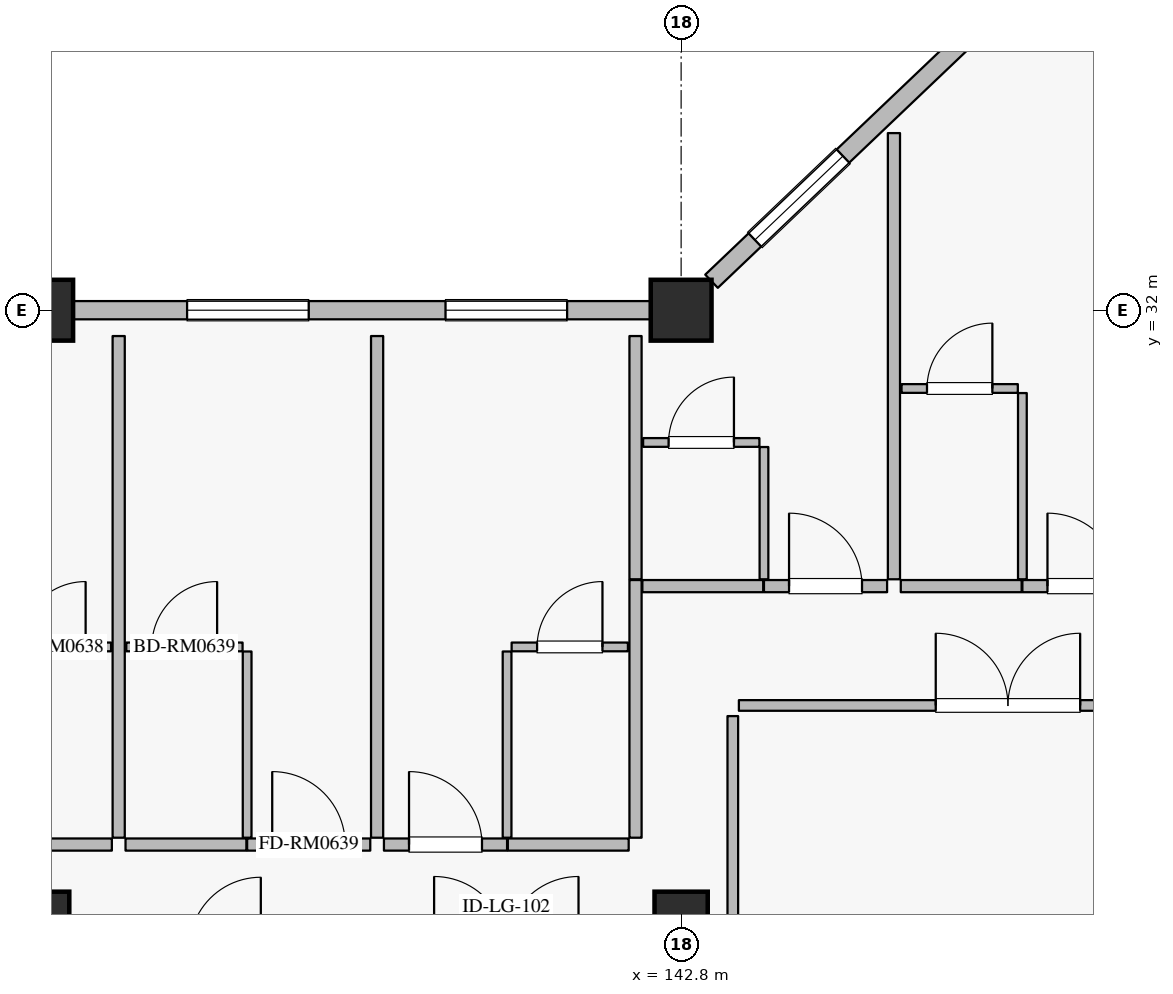
"""IFC4 building model, lengths in metres.
Left out: names, types, materials, properties, quantities, classifications, styles, units other than length and angle.
Written with IfcOpenShell. Run it as: python <this file> out.ifc"""

import sys

from ifc_helpers import new_model, si_unit, direction, frame, frame_2d, origin, origin_2d, place, context, subcontext, project, spatial, rectangle, extrude, element, fill, save


model = new_model("IFC4")
c1 = context("Model", 3, precision=1e-05, world=origin(), true_north=direction((0.0, 1.0)))
c2 = subcontext(c1, "Body", "Model", "MODEL_VIEW")
j1 = project(units=[si_unit("LENGTHUNIT", "METRE"), si_unit("PLANEANGLEUNIT", "RADIAN")], contexts=[c1])
p1 = place(None, origin())
s1 = spatial("IfcSite", under=j1, at=p1, CompositionType="ELEMENT")
p2 = place(p1, origin())
s2 = spatial("IfcBuilding", under=s1, at=p2, CompositionType="ELEMENT")
p3 = place(p2, frame((0.0, 0.0, 25.2)))
s3 = spatial("IfcBuildingStorey", under=s2, at=p3, CompositionType="ELEMENT", Elevation=25.2)
for number, where, z_axis, x_axis in (
    (1, (134.4, 32.0, 0.0), (0.0, 0.0, 1.0), (1.0, 0.0, 0.0)),
    (2, (142.8, 32.0, 0.0), (0.0, 0.0, 1.0), (1.0, 0.0, 0.0)),
):
    element("IfcColumn", number, at=place(p3, frame(where, z_axis=z_axis, x_axis=x_axis)), inside=s3, PredefinedType="COLUMN", context=c2, shape_type="SweptSolid", body=[
        extrude(rectangle(XDim=0.8, YDim=0.8, at=origin_2d()), origin(), (0.0, 0.0, 1.0), 3.6),
    ])
for number, where, z_axis, x_axis in (
    (3, (134.4, 24.0, 0.0), (0.0, 0.0, 1.0), (1.0, 0.0, 0.0)),
    (4, (142.8, 24.0, 0.0), (0.0, 0.0, 1.0), (1.0, 0.0, 0.0)),
):
    element("IfcColumn", number, at=place(p3, frame(where, z_axis=z_axis, x_axis=x_axis)), inside=s3, PredefinedType="COLUMN", context=c2, shape_type="SweptSolid", body=[
        extrude(rectangle(XDim=0.7, YDim=0.7, at=origin_2d()), origin(), (0.0, 0.0, 1.0), 3.6),
    ])
p4 = place(p3, frame((134.8, 32.0, 0.0), z_axis=(0.0, 0.0, 1.0), x_axis=(1.0, 0.0, 0.0)))
e5 = element("IfcWall", 5, at=p4, inside=s3, PredefinedType="SOLIDWALL", context=c2, shape_type="SweptSolid", body=[
    extrude(rectangle(XDim=7.6, YDim=0.24, at=frame_2d((3.8, 0.0))), origin(), (0.0, 0.0, 1.0), 2.93),
])
p5 = place(p4, frame((1.5, 0.0, 0.8)))
e6 = element("IfcOpeningElement", 6, at=p5, cuts=e5, PredefinedType="OPENING", context=c2, shape_type="SweptSolid", body=[
    extrude(rectangle(XDim=1.6, YDim=1.6, at=frame_2d((0.8, 0.8))), frame((0.0, 0.13, 0.0), z_axis=(0.0, -1.0, 0.0), x_axis=(1.0, 0.0, 0.0)), (0.0, 0.0, 1.0), 0.26),
])
p6 = place(p4, frame((4.9, 0.0, 0.8)))
e7 = element("IfcOpeningElement", 7, at=p6, cuts=e5, PredefinedType="OPENING", context=c2, shape_type="SweptSolid", body=[
    extrude(rectangle(XDim=1.6, YDim=1.6, at=frame_2d((0.8, 0.8))), frame((0.0, 0.13, 0.0), z_axis=(0.0, -1.0, 0.0), x_axis=(1.0, 0.0, 0.0)), (0.0, 0.0, 1.0), 0.26),
])
p7 = place(p3, frame((143.2, 32.381, 0.0), z_axis=(0.0, 0.0, 1.0), x_axis=(0.724156739794, 0.689635422677, 0.0)))
e8 = element("IfcWall", 8, at=p7, inside=s3, PredefinedType="SOLIDWALL", context=c2, shape_type="SweptSolid", body=[
    extrude(rectangle(XDim=10.495, YDim=0.24, at=frame_2d((5.248, 0.0))), origin(), (0.0, 0.0, 1.0), 2.93),
])
p8 = place(p7, frame((0.788, 0.0, 0.8)))
e9 = element("IfcOpeningElement", 9, at=p8, cuts=e8, PredefinedType="OPENING", context=c2, shape_type="SweptSolid", body=[
    extrude(rectangle(XDim=1.6, YDim=1.6, at=frame_2d((0.8, 0.8))), frame((0.0, 0.13, 0.0), z_axis=(0.0, -1.0, 0.0), x_axis=(1.0, 0.0, 0.0)), (0.0, 0.0, 1.0), 0.26),
])
p9 = place(p7, frame((4.862, 0.0, 0.8)))
e10 = element("IfcOpeningElement", 10, at=p9, cuts=e8, PredefinedType="OPENING", context=c2, shape_type="SweptSolid", body=[
    extrude(rectangle(XDim=1.6, YDim=1.6, at=frame_2d((0.8, 0.8))), frame((0.0, 0.13, 0.0), z_axis=(0.0, -1.0, 0.0), x_axis=(1.0, 0.0, 0.0)), (0.0, 0.0, 1.0), 0.26),
])
p10 = place(p7, frame((8.521, 0.0, 0.8)))
e11 = element("IfcOpeningElement", 11, at=p10, cuts=e8, PredefinedType="OPENING", context=c2, shape_type="SweptSolid", body=[
    extrude(rectangle(XDim=1.6, YDim=1.6, at=frame_2d((0.8, 0.8))), frame((0.0, 0.13, 0.0), z_axis=(0.0, -1.0, 0.0), x_axis=(1.0, 0.0, 0.0)), (0.0, 0.0, 1.0), 0.26),
])
p11 = place(p3, frame((133.72, 24.97, 0.0), z_axis=(0.0, 0.0, 1.0), x_axis=(1.0, 0.0, 0.0)))
e12 = element("IfcWall", 12, at=p11, inside=s3, PredefinedType="PARTITIONING", context=c2, shape_type="SweptSolid", body=[
    extrude(rectangle(XDim=1.59, YDim=0.16, at=frame_2d((0.795, 0.0))), origin(), (0.0, 0.0, 1.0), 3.335),
])
p12 = place(p3, frame((133.77, 27.57, 0.0), z_axis=(0.0, 0.0, 1.0), x_axis=(1.0, 0.0, 0.0)))
e13 = element("IfcWall", 13, at=p12, inside=s3, PredefinedType="PARTITIONING", context=c2, shape_type="SweptSolid", body=[
    extrude(rectangle(XDim=1.53, YDim=0.115, at=frame_2d((0.765, 0.0))), origin(), (0.0, 0.0, 1.0), 3.335),
])
p13 = place(p12, frame((0.335, 0.0, 0.0)))
e14 = element("IfcOpeningElement", 14, at=p13, cuts=e13, PredefinedType="OPENING", context=c2, shape_type="SweptSolid", body=[
    extrude(rectangle(XDim=0.86, YDim=2.12, at=frame_2d((0.43, 1.06))), frame((0.0, 0.067, 0.0), z_axis=(0.0, -1.0, 0.0), x_axis=(1.0, 0.0, 0.0)), (0.0, 0.0, 1.0), 0.135),
])
p14 = place(p3, frame((135.49, 24.97, 0.0), z_axis=(0.0, 0.0, 1.0), x_axis=(1.0, 0.0, 0.0)))
e15 = element("IfcWall", 15, at=p14, inside=s3, PredefinedType="PARTITIONING", context=c2, shape_type="SweptSolid", body=[
    extrude(rectangle(XDim=1.59, YDim=0.16, at=frame_2d((0.795, 0.0))), origin(), (0.0, 0.0, 1.0), 3.335),
])
p15 = place(p3, frame((137.09, 24.97, 0.0), z_axis=(0.0, 0.0, 1.0), x_axis=(1.0, 0.0, 0.0)))
e16 = element("IfcWall", 16, at=p15, inside=s3, PredefinedType="PARTITIONING", context=c2, shape_type="SweptSolid", body=[
    extrude(rectangle(XDim=1.62, YDim=0.16, at=frame_2d((0.81, 0.0))), origin(), (0.0, 0.0, 1.0), 3.335),
])
p16 = place(p15, frame((0.33, 0.0, 0.0)))
e17 = element("IfcOpeningElement", 17, at=p16, cuts=e16, PredefinedType="OPENING", context=c2, shape_type="SweptSolid", body=[
    extrude(rectangle(XDim=0.96, YDim=2.2, at=frame_2d((0.48, 1.1))), frame((0.0, 0.09, 0.0), z_axis=(0.0, -1.0, 0.0), x_axis=(1.0, 0.0, 0.0)), (0.0, 0.0, 1.0), 0.18),
])
p17 = place(p3, frame((137.09, 25.06, 0.0), z_axis=(0.0, 0.0, 1.0), x_axis=(0.0, 1.0, 0.0)))
e18 = element("IfcWall", 18, at=p17, inside=s3, PredefinedType="PARTITIONING", context=c2, shape_type="SweptSolid", body=[
    extrude(rectangle(XDim=2.45, YDim=0.115, at=frame_2d((1.225, 0.0))), origin(), (0.0, 0.0, 1.0), 3.335),
])
p18 = place(p3, frame((135.5, 27.57, 0.0), z_axis=(0.0, 0.0, 1.0), x_axis=(1.0, 0.0, 0.0)))
e19 = element("IfcWall", 19, at=p18, inside=s3, PredefinedType="PARTITIONING", context=c2, shape_type="SweptSolid", body=[
    extrude(rectangle(XDim=1.53, YDim=0.115, at=frame_2d((0.765, 0.0))), origin(), (0.0, 0.0, 1.0), 3.335),
])
p19 = place(p18, frame((0.335, 0.0, 0.0)))
e20 = element("IfcOpeningElement", 20, at=p19, cuts=e19, PredefinedType="OPENING", context=c2, shape_type="SweptSolid", body=[
    extrude(rectangle(XDim=0.86, YDim=2.12, at=frame_2d((0.43, 1.06))), frame((0.0, 0.067, 0.0), z_axis=(0.0, -1.0, 0.0), x_axis=(1.0, 0.0, 0.0)), (0.0, 0.0, 1.0), 0.135),
])
p20 = place(p3, frame((135.4, 25.06, 0.0), z_axis=(0.0, 0.0, 1.0), x_axis=(0.0, 1.0, 0.0)))
e21 = element("IfcWall", 21, at=p20, inside=s3, PredefinedType="PARTITIONING", context=c2, shape_type="SweptSolid", body=[
    extrude(rectangle(XDim=6.6, YDim=0.16, at=frame_2d((3.3, 0.0))), origin(), (0.0, 0.0, 1.0), 3.335),
])
p21 = place(p3, frame((138.89, 24.97, 0.0), z_axis=(0.0, 0.0, 1.0), x_axis=(1.0, 0.0, 0.0)))
e22 = element("IfcWall", 22, at=p21, inside=s3, PredefinedType="PARTITIONING", context=c2, shape_type="SweptSolid", body=[
    extrude(rectangle(XDim=1.62, YDim=0.16, at=frame_2d((0.81, 0.0))), origin(), (0.0, 0.0, 1.0), 3.335),
])
p22 = place(p21, frame((0.33, 0.0, 0.0)))
e23 = element("IfcOpeningElement", 23, at=p22, cuts=e22, PredefinedType="OPENING", context=c2, shape_type="SweptSolid", body=[
    extrude(rectangle(XDim=0.96, YDim=2.2, at=frame_2d((0.48, 1.1))), frame((0.0, 0.09, 0.0), z_axis=(0.0, -1.0, 0.0), x_axis=(1.0, 0.0, 0.0)), (0.0, 0.0, 1.0), 0.18),
])
p23 = place(p3, frame((140.52, 24.97, 0.0), z_axis=(0.0, 0.0, 1.0), x_axis=(1.0, 0.0, 0.0)))
e24 = element("IfcWall", 24, at=p23, inside=s3, PredefinedType="PARTITIONING", context=c2, shape_type="SweptSolid", body=[
    extrude(rectangle(XDim=1.59, YDim=0.16, at=frame_2d((0.795, 0.0))), origin(), (0.0, 0.0, 1.0), 3.335),
])
p24 = place(p3, frame((140.51, 25.06, 0.0), z_axis=(0.0, 0.0, 1.0), x_axis=(0.0, 1.0, 0.0)))
e25 = element("IfcWall", 25, at=p24, inside=s3, PredefinedType="PARTITIONING", context=c2, shape_type="SweptSolid", body=[
    extrude(rectangle(XDim=2.45, YDim=0.115, at=frame_2d((1.225, 0.0))), origin(), (0.0, 0.0, 1.0), 3.335),
])
p25 = place(p3, frame((140.57, 27.57, 0.0), z_axis=(0.0, 0.0, 1.0), x_axis=(1.0, 0.0, 0.0)))
e26 = element("IfcWall", 26, at=p25, inside=s3, PredefinedType="PARTITIONING", context=c2, shape_type="SweptSolid", body=[
    extrude(rectangle(XDim=1.53, YDim=0.115, at=frame_2d((0.765, 0.0))), origin(), (0.0, 0.0, 1.0), 3.335),
])
p26 = place(p25, frame((0.335, 0.0, 0.0)))
e27 = element("IfcOpeningElement", 27, at=p26, cuts=e26, PredefinedType="OPENING", context=c2, shape_type="SweptSolid", body=[
    extrude(rectangle(XDim=0.86, YDim=2.12, at=frame_2d((0.43, 1.06))), frame((0.0, 0.067, 0.0), z_axis=(0.0, -1.0, 0.0), x_axis=(1.0, 0.0, 0.0)), (0.0, 0.0, 1.0), 0.135),
])
p27 = place(p3, frame((138.8, 25.06, 0.0), z_axis=(0.0, 0.0, 1.0), x_axis=(0.0, 1.0, 0.0)))
e28 = element("IfcWall", 28, at=p27, inside=s3, PredefinedType="PARTITIONING", context=c2, shape_type="SweptSolid", body=[
    extrude(rectangle(XDim=6.6, YDim=0.16, at=frame_2d((3.3, 0.0))), origin(), (0.0, 0.0, 1.0), 3.335),
])
p28 = place(p3, frame((142.2, 25.06, 0.0), z_axis=(0.0, 0.0, 1.0), x_axis=(0.0, 1.0, 0.0)))
e29 = element("IfcWall", 29, at=p28, inside=s3, PredefinedType="PARTITIONING", context=c2, shape_type="SweptSolid", body=[
    extrude(rectangle(XDim=3.39, YDim=0.16, at=frame_2d((1.695, 0.0))), origin(), (0.0, 0.0, 1.0), 3.335),
])
p29 = place(p3, frame((142.29, 28.37, 0.0), z_axis=(0.0, 0.0, 1.0), x_axis=(1.0, 0.0, 0.0)))
e30 = element("IfcWall", 30, at=p29, inside=s3, PredefinedType="PARTITIONING", context=c2, shape_type="SweptSolid", body=[
    extrude(rectangle(XDim=1.59, YDim=0.16, at=frame_2d((0.795, 0.0))), origin(), (0.0, 0.0, 1.0), 3.335),
])
p30 = place(p3, frame((143.89, 28.37, 0.0), z_axis=(0.0, 0.0, 1.0), x_axis=(1.0, 0.0, 0.0)))
e31 = element("IfcWall", 31, at=p30, inside=s3, PredefinedType="PARTITIONING", context=c2, shape_type="SweptSolid", body=[
    extrude(rectangle(XDim=1.62, YDim=0.16, at=frame_2d((0.81, 0.0))), origin(), (0.0, 0.0, 1.0), 3.335),
])
p31 = place(p30, frame((0.33, 0.0, 0.0)))
e32 = element("IfcOpeningElement", 32, at=p31, cuts=e31, PredefinedType="OPENING", context=c2, shape_type="SweptSolid", body=[
    extrude(rectangle(XDim=0.96, YDim=2.2, at=frame_2d((0.48, 1.1))), frame((0.0, 0.09, 0.0), z_axis=(0.0, -1.0, 0.0), x_axis=(1.0, 0.0, 0.0)), (0.0, 0.0, 1.0), 0.18),
])
p32 = place(p3, frame((143.89, 28.46, 0.0), z_axis=(0.0, 0.0, 1.0), x_axis=(0.0, 1.0, 0.0)))
e33 = element("IfcWall", 33, at=p32, inside=s3, PredefinedType="PARTITIONING", context=c2, shape_type="SweptSolid", body=[
    extrude(rectangle(XDim=1.74, YDim=0.115, at=frame_2d((0.87, 0.0))), origin(), (0.0, 0.0, 1.0), 3.335),
])
p33 = place(p3, frame((142.3, 30.26, 0.0), z_axis=(0.0, 0.0, 1.0), x_axis=(1.0, 0.0, 0.0)))
e34 = element("IfcWall", 34, at=p33, inside=s3, PredefinedType="PARTITIONING", context=c2, shape_type="SweptSolid", body=[
    extrude(rectangle(XDim=1.53, YDim=0.115, at=frame_2d((0.765, 0.0))), origin(), (0.0, 0.0, 1.0), 3.335),
])
p34 = place(p33, frame((0.335, 0.0, 0.0)))
e35 = element("IfcOpeningElement", 35, at=p34, cuts=e34, PredefinedType="OPENING", context=c2, shape_type="SweptSolid", body=[
    extrude(rectangle(XDim=0.86, YDim=2.12, at=frame_2d((0.43, 1.06))), frame((0.0, 0.067, 0.0), z_axis=(0.0, -1.0, 0.0), x_axis=(1.0, 0.0, 0.0)), (0.0, 0.0, 1.0), 0.135),
])
p35 = place(p3, frame((142.2, 28.46, 0.0), z_axis=(0.0, 0.0, 1.0), x_axis=(0.0, 1.0, 0.0)))
e36 = element("IfcWall", 36, at=p35, inside=s3, PredefinedType="PARTITIONING", context=c2, shape_type="SweptSolid", body=[
    extrude(rectangle(XDim=3.2, YDim=0.16, at=frame_2d((1.6, 0.0))), origin(), (0.0, 0.0, 1.0), 3.335),
])
p36 = place(p3, frame((145.69, 28.37, 0.0), z_axis=(0.0, 0.0, 1.0), x_axis=(1.0, 0.0, 0.0)))
e37 = element("IfcWall", 37, at=p36, inside=s3, PredefinedType="PARTITIONING", context=c2, shape_type="SweptSolid", body=[
    extrude(rectangle(XDim=1.59, YDim=0.16, at=frame_2d((0.795, 0.0))), origin(), (0.0, 0.0, 1.0), 3.335),
])
p37 = place(p3, frame((147.29, 28.37, 0.0), z_axis=(0.0, 0.0, 1.0), x_axis=(1.0, 0.0, 0.0)))
e38 = element("IfcWall", 38, at=p37, inside=s3, PredefinedType="PARTITIONING", context=c2, shape_type="SweptSolid", body=[
    extrude(rectangle(XDim=1.62, YDim=0.16, at=frame_2d((0.81, 0.0))), origin(), (0.0, 0.0, 1.0), 3.335),
])
p38 = place(p37, frame((0.33, 0.0, 0.0)))
e39 = element("IfcOpeningElement", 39, at=p38, cuts=e38, PredefinedType="OPENING", context=c2, shape_type="SweptSolid", body=[
    extrude(rectangle(XDim=0.96, YDim=2.2, at=frame_2d((0.48, 1.1))), frame((0.0, 0.09, 0.0), z_axis=(0.0, -1.0, 0.0), x_axis=(1.0, 0.0, 0.0)), (0.0, 0.0, 1.0), 0.18),
])
p39 = place(p3, frame((147.29, 28.46, 0.0), z_axis=(0.0, 0.0, 1.0), x_axis=(0.0, 1.0, 0.0)))
e40 = element("IfcWall", 40, at=p39, inside=s3, PredefinedType="PARTITIONING", context=c2, shape_type="SweptSolid", body=[
    extrude(rectangle(XDim=2.45, YDim=0.115, at=frame_2d((1.225, 0.0))), origin(), (0.0, 0.0, 1.0), 3.335),
])
p40 = place(p3, frame((145.7, 30.97, 0.0), z_axis=(0.0, 0.0, 1.0), x_axis=(1.0, 0.0, 0.0)))
e41 = element("IfcWall", 41, at=p40, inside=s3, PredefinedType="PARTITIONING", context=c2, shape_type="SweptSolid", body=[
    extrude(rectangle(XDim=1.53, YDim=0.115, at=frame_2d((0.765, 0.0))), origin(), (0.0, 0.0, 1.0), 3.335),
])
p41 = place(p40, frame((0.335, 0.0, 0.0)))
e42 = element("IfcOpeningElement", 42, at=p41, cuts=e41, PredefinedType="OPENING", context=c2, shape_type="SweptSolid", body=[
    extrude(rectangle(XDim=0.86, YDim=2.12, at=frame_2d((0.43, 1.06))), frame((0.0, 0.067, 0.0), z_axis=(0.0, -1.0, 0.0), x_axis=(1.0, 0.0, 0.0)), (0.0, 0.0, 1.0), 0.135),
])
p42 = place(p3, frame((145.6, 28.46, 0.0), z_axis=(0.0, 0.0, 1.0), x_axis=(0.0, 1.0, 0.0)))
e43 = element("IfcWall", 43, at=p42, inside=s3, PredefinedType="PARTITIONING", context=c2, shape_type="SweptSolid", body=[
    extrude(rectangle(XDim=5.87, YDim=0.16, at=frame_2d((2.935, 0.0))), origin(), (0.0, 0.0, 1.0), 3.335),
])
p43 = place(p3, frame((143.56, 26.8, 0.0), z_axis=(0.0, 0.0, 1.0), x_axis=(1.0, 0.0, 0.0)))
e44 = element("IfcWall", 44, at=p43, inside=s3, PredefinedType="PARTITIONING", context=c2, shape_type="SweptSolid", body=[
    extrude(rectangle(XDim=7.08, YDim=0.14, at=frame_2d((3.54, 0.0))), origin(), (0.0, 0.0, 1.0), 3.335),
])
p44 = place(p43, frame((2.59, 0.0, 0.0)))
e45 = element("IfcOpeningElement", 45, at=p44, cuts=e44, PredefinedType="OPENING", context=c2, shape_type="SweptSolid", body=[
    extrude(rectangle(XDim=1.9, YDim=2.4, at=frame_2d((0.95, 1.2))), frame((0.0, 0.08, 0.0), z_axis=(0.0, -1.0, 0.0), x_axis=(1.0, 0.0, 0.0)), (0.0, 0.0, 1.0), 0.16),
])
p45 = place(p3, frame((143.48, 23.45, 0.0), z_axis=(0.0, 0.0, 1.0), x_axis=(0.0, 1.0, 0.0)))
e46 = element("IfcWall", 46, at=p45, inside=s3, PredefinedType="PARTITIONING", context=c2, shape_type="SweptSolid", body=[
    extrude(rectangle(XDim=3.21, YDim=0.14, at=frame_2d((1.605, 0.0))), origin(), (0.0, 0.0, 1.0), 3.335),
])
p46 = place(p5, origin())
e47 = element("IfcWindow", 47, at=p46, inside=s3, PartitioningType="SINGLE_PANEL", PredefinedType="WINDOW", context=c2, shape_type="SweptSolid", body=[
    extrude(rectangle(XDim=1.6, YDim=1.6, at=frame_2d((0.8, 0.8))), frame((0.0, 0.03, 0.0), z_axis=(0.0, -1.0, 0.0), x_axis=(1.0, 0.0, 0.0)), (0.0, 0.0, 1.0), 0.06),
])
fill(e6, e47)
p47 = place(p6, origin())
e48 = element("IfcWindow", 48, at=p47, inside=s3, PartitioningType="SINGLE_PANEL", PredefinedType="WINDOW", context=c2, shape_type="SweptSolid", body=[
    extrude(rectangle(XDim=1.6, YDim=1.6, at=frame_2d((0.8, 0.8))), frame((0.0, 0.03, 0.0), z_axis=(0.0, -1.0, 0.0), x_axis=(1.0, 0.0, 0.0)), (0.0, 0.0, 1.0), 0.06),
])
fill(e7, e48)
p48 = place(p8, origin())
e49 = element("IfcWindow", 49, at=p48, inside=s3, PartitioningType="SINGLE_PANEL", PredefinedType="WINDOW", context=c2, shape_type="SweptSolid", body=[
    extrude(rectangle(XDim=1.6, YDim=1.6, at=frame_2d((0.8, 0.8))), frame((0.0, 0.03, 0.0), z_axis=(0.0, -1.0, 0.0), x_axis=(1.0, 0.0, 0.0)), (0.0, 0.0, 1.0), 0.06),
])
fill(e9, e49)
p49 = place(p13, origin())
e50 = element("IfcDoor", 50, at=p49, inside=s3, OperationType="SINGLE_SWING_RIGHT", PredefinedType="DOOR", context=c2, shape_type="SweptSolid", body=[
    extrude(rectangle(XDim=0.86, YDim=2.12, at=frame_2d((0.43, 1.06))), frame((0.0, 0.025, 0.0), z_axis=(0.0, -1.0, 0.0), x_axis=(1.0, 0.0, 0.0)), (0.0, 0.0, 1.0), 0.05),
])
fill(e14, e50)
p50 = place(p16, origin())
e51 = element("IfcDoor", 51, at=p50, inside=s3, OperationType="SINGLE_SWING_LEFT", PredefinedType="DOOR", context=c2, shape_type="SweptSolid", body=[
    extrude(rectangle(XDim=0.96, YDim=2.2, at=frame_2d((0.48, 1.1))), frame((0.0, 0.025, 0.0), z_axis=(0.0, -1.0, 0.0), x_axis=(1.0, 0.0, 0.0)), (0.0, 0.0, 1.0), 0.05),
])
fill(e17, e51)
p51 = place(p19, origin())
e52 = element("IfcDoor", 52, at=p51, inside=s3, OperationType="SINGLE_SWING_RIGHT", PredefinedType="DOOR", context=c2, shape_type="SweptSolid", body=[
    extrude(rectangle(XDim=0.86, YDim=2.12, at=frame_2d((0.43, 1.06))), frame((0.0, 0.025, 0.0), z_axis=(0.0, -1.0, 0.0), x_axis=(1.0, 0.0, 0.0)), (0.0, 0.0, 1.0), 0.05),
])
fill(e20, e52)
p52 = place(p22, origin())
e53 = element("IfcDoor", 53, at=p52, inside=s3, OperationType="SINGLE_SWING_LEFT", PredefinedType="DOOR", context=c2, shape_type="SweptSolid", body=[
    extrude(rectangle(XDim=0.96, YDim=2.2, at=frame_2d((0.48, 1.1))), frame((0.0, 0.025, 0.0), z_axis=(0.0, -1.0, 0.0), x_axis=(1.0, 0.0, 0.0)), (0.0, 0.0, 1.0), 0.05),
])
fill(e23, e53)
p53 = place(p26, origin())
e54 = element("IfcDoor", 54, at=p53, inside=s3, OperationType="SINGLE_SWING_RIGHT", PredefinedType="DOOR", context=c2, shape_type="SweptSolid", body=[
    extrude(rectangle(XDim=0.86, YDim=2.12, at=frame_2d((0.43, 1.06))), frame((0.0, 0.025, 0.0), z_axis=(0.0, -1.0, 0.0), x_axis=(1.0, 0.0, 0.0)), (0.0, 0.0, 1.0), 0.05),
])
fill(e27, e54)
p54 = place(p31, origin())
e55 = element("IfcDoor", 55, at=p54, inside=s3, OperationType="SINGLE_SWING_LEFT", PredefinedType="DOOR", context=c2, shape_type="SweptSolid", body=[
    extrude(rectangle(XDim=0.96, YDim=2.2, at=frame_2d((0.48, 1.1))), frame((0.0, 0.025, 0.0), z_axis=(0.0, -1.0, 0.0), x_axis=(1.0, 0.0, 0.0)), (0.0, 0.0, 1.0), 0.05),
])
fill(e32, e55)
p55 = place(p34, origin())
e56 = element("IfcDoor", 56, at=p55, inside=s3, OperationType="SINGLE_SWING_RIGHT", PredefinedType="DOOR", context=c2, shape_type="SweptSolid", body=[
    extrude(rectangle(XDim=0.86, YDim=2.12, at=frame_2d((0.43, 1.06))), frame((0.0, 0.025, 0.0), z_axis=(0.0, -1.0, 0.0), x_axis=(1.0, 0.0, 0.0)), (0.0, 0.0, 1.0), 0.05),
])
fill(e35, e56)
p56 = place(p38, origin())
e57 = element("IfcDoor", 57, at=p56, inside=s3, OperationType="SINGLE_SWING_LEFT", PredefinedType="DOOR", context=c2, shape_type="SweptSolid", body=[
    extrude(rectangle(XDim=0.96, YDim=2.2, at=frame_2d((0.48, 1.1))), frame((0.0, 0.025, 0.0), z_axis=(0.0, -1.0, 0.0), x_axis=(1.0, 0.0, 0.0)), (0.0, 0.0, 1.0), 0.05),
])
fill(e39, e57)
p57 = place(p41, origin())
e58 = element("IfcDoor", 58, at=p57, inside=s3, OperationType="SINGLE_SWING_RIGHT", PredefinedType="DOOR", context=c2, shape_type="SweptSolid", body=[
    extrude(rectangle(XDim=0.86, YDim=2.12, at=frame_2d((0.43, 1.06))), frame((0.0, 0.025, 0.0), z_axis=(0.0, -1.0, 0.0), x_axis=(1.0, 0.0, 0.0)), (0.0, 0.0, 1.0), 0.05),
])
fill(e42, e58)
p58 = place(p44, origin())
e59 = element("IfcDoor", 59, at=p58, inside=s3, OperationType="DOUBLE_DOOR_SINGLE_SWING", PredefinedType="DOOR", context=c2, shape_type="SweptSolid", body=[
    extrude(rectangle(XDim=1.9, YDim=2.4, at=frame_2d((0.95, 1.2))), frame((0.0, 0.025, 0.0), z_axis=(0.0, -1.0, 0.0), x_axis=(1.0, 0.0, 0.0)), (0.0, 0.0, 1.0), 0.05),
])
fill(e45, e59)
save(model, sys.argv[1])
